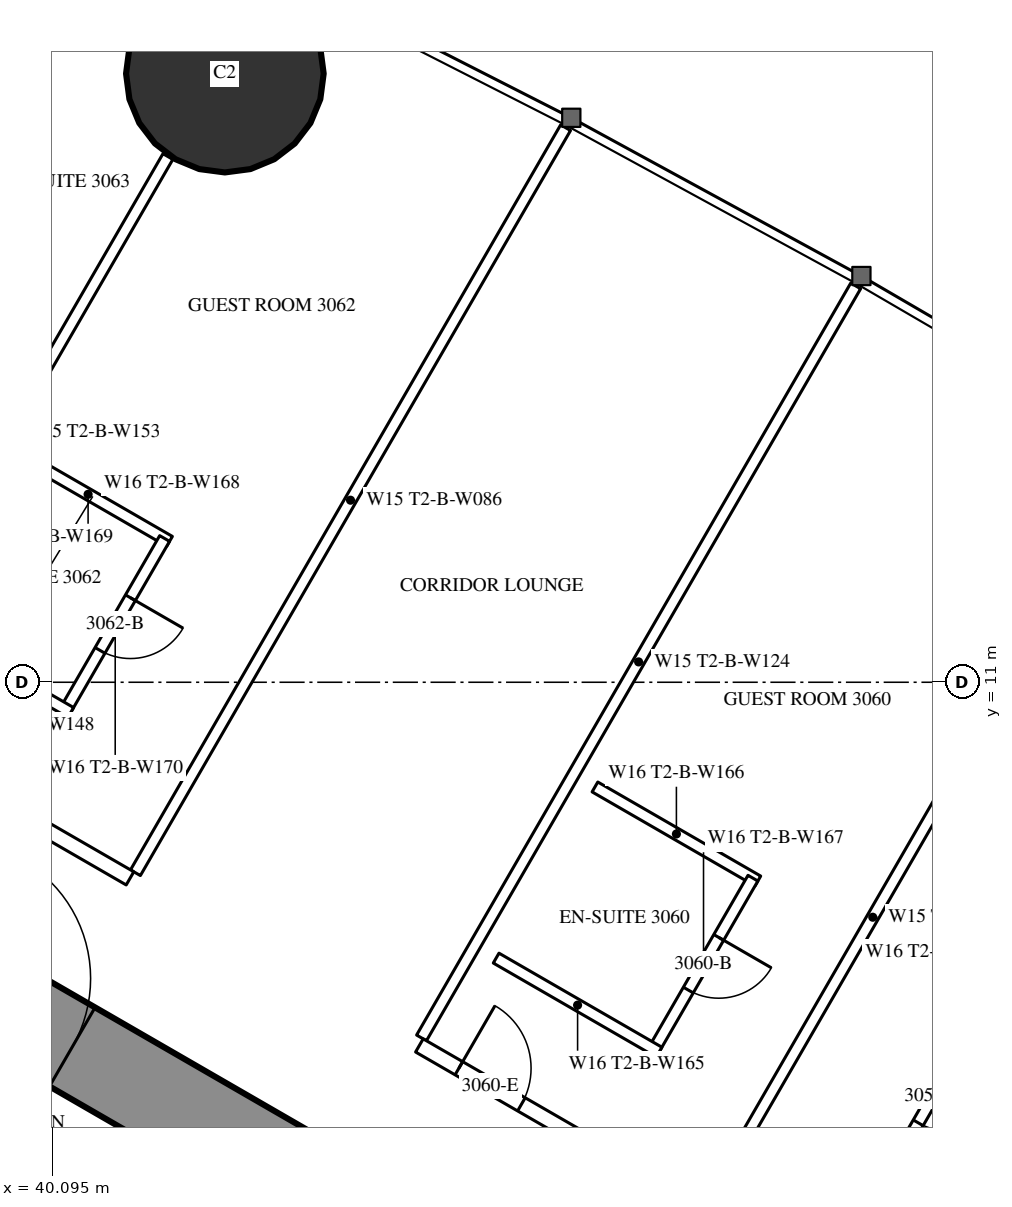
"""IFC4 building model, lengths in metres.
Left out: names, types, materials, properties, quantities, classifications, styles, units other than length and angle.
Written with IfcOpenShell. Run it as: python <this file> out.ifc"""

import sys

from ifc_helpers import new_model, si_unit, direction, frame, frame_2d, origin, origin_2d, place, context, subcontext, project, spatial, rectangle, hollow_circle, extrude, element, fill, save


model = new_model("IFC4")
c1 = context("Model", 3, precision=1e-05, world=origin(), true_north=direction((0.0, 1.0)))
c2 = subcontext(c1, "Body", "Model", "MODEL_VIEW")
j1 = project(units=[si_unit("LENGTHUNIT", "METRE"), si_unit("PLANEANGLEUNIT", "RADIAN")], contexts=[c1])
p1 = place(None, origin())
s1 = spatial("IfcSite", under=j1, at=p1, CompositionType="ELEMENT")
p2 = place(p1, origin())
s2 = spatial("IfcBuilding", under=s1, at=p2, CompositionType="ELEMENT")
p3 = place(p2, frame((0.0, 0.0, 115.1)))
s3 = spatial("IfcBuildingStorey", under=s2, at=p3, CompositionType="ELEMENT", Elevation=115.1)
p4 = place(p3, frame((42.366, 19.007, 0.0), z_axis=(0.0, 0.0, 1.0), x_axis=(1.0, 0.0, 0.0)))
e1 = element("IfcColumn", 1, at=p4, inside=s3, PredefinedType="COLUMN", context=c2, shape_type="SweptSolid", body=[
    extrude(hollow_circle(Radius=1.3, WallThickness=0.1, at=origin_2d()), origin(), (0.0, 0.0, 1.0), 3.5),
])
p5 = place(p3, frame((27.2, 13.8, 0.0), z_axis=(0.0, 0.0, 1.0), x_axis=(0.866024515034, -0.500001539357, 0.0)))
e2 = element("IfcWall", 2, at=p5, inside=s3, PredefinedType="SHEAR", context=c2, shape_type="SweptSolid", body=[
    extrude(rectangle(XDim=26.907, YDim=1.2, at=frame_2d((13.454, 0.0))), origin(), (0.0, 0.0, 1.0), 3.5),
])
p6 = place(p5, frame((4.6, 0.0, 0.0)))
e3 = element("IfcOpeningElement", 3, at=p6, cuts=e2, PredefinedType="OPENING", context=c2, shape_type="SweptSolid", body=[
    extrude(rectangle(XDim=1.0, YDim=2.2, at=frame_2d((0.5, 1.1))), frame((0.0, 0.61, 0.0), z_axis=(0.0, -1.0, 0.0), x_axis=(1.0, 0.0, 0.0)), (0.0, 0.0, 1.0), 1.22),
])
p7 = place(p5, frame((13.395, 0.0, 0.0)))
e4 = element("IfcOpeningElement", 4, at=p7, cuts=e2, PredefinedType="OPENING", context=c2, shape_type="SweptSolid", body=[
    extrude(rectangle(XDim=1.8, YDim=2.2, at=frame_2d((0.9, 1.1))), frame((0.0, 0.61, 0.0), z_axis=(0.0, -1.0, 0.0), x_axis=(1.0, 0.0, 0.0)), (0.0, 0.0, 1.0), 1.22),
])
p8 = place(p3, frame((37.43, 10.665, 0.0), z_axis=(0.0, 0.0, 1.0), x_axis=(0.499989991081, 0.866031182359, 0.0)))
e5 = element("IfcWall", 5, at=p8, inside=s3, PredefinedType="PARTITIONING", context=c2, shape_type="SweptSolid", body=[
    extrude(rectangle(XDim=8.373, YDim=0.15, at=frame_2d((4.187, 0.0))), origin(), (0.0, 0.0, 1.0), 2.2),
])
p9 = place(p3, frame((41.19, 8.494, 0.0), z_axis=(0.0, 0.0, 1.0), x_axis=(0.49999258054, 0.866029687369, 0.0)))
e6 = element("IfcWall", 6, at=p9, inside=s3, PredefinedType="PARTITIONING", context=c2, shape_type="SweptSolid", body=[
    extrude(rectangle(XDim=11.318, YDim=0.15, at=frame_2d((5.659, 0.0))), origin(), (0.0, 0.0, 1.0), 3.25),
])
p10 = place(p3, frame((44.954, 6.321, 0.0), z_axis=(0.0, 0.0, 1.0), x_axis=(0.500009815811, 0.866019736549, 0.0)))
e7 = element("IfcWall", 7, at=p10, inside=s3, PredefinedType="PARTITIONING", context=c2, shape_type="SweptSolid", body=[
    extrude(rectangle(XDim=11.424, YDim=0.15, at=frame_2d((5.712, 0.0))), origin(), (0.0, 0.0, 1.0), 3.25),
])
p11 = place(p3, frame((48.719, 4.147, 0.0), z_axis=(0.0, 0.0, 1.0), x_axis=(0.499993328235, 0.866029255696, 0.0)))
e8 = element("IfcWall", 8, at=p11, inside=s3, PredefinedType="PARTITIONING", context=c2, shape_type="SweptSolid", body=[
    extrude(rectangle(XDim=8.686, YDim=0.15, at=frame_2d((4.343, 0.0))), origin(), (0.0, 0.0, 1.0), 2.2),
])
p12 = place(p3, frame((36.834, 10.894, 0.0), z_axis=(0.0, 0.0, 1.0), x_axis=(0.866032723471, -0.499987321717, 0.0)))
e9 = element("IfcWall", 9, at=p12, inside=s3, PredefinedType="PARTITIONING", context=c2, shape_type="SweptSolid", body=[
    extrude(rectangle(XDim=4.947, YDim=0.2, at=frame_2d((2.474, 0.0))), origin(), (0.0, 0.0, 1.0), 3.25),
])
p13 = place(p12, frame((1.006, 0.0, 0.0)))
e10 = element("IfcOpeningElement", 10, at=p13, cuts=e9, PredefinedType="OPENING", context=c2, shape_type="SweptSolid", body=[
    extrude(rectangle(XDim=0.95, YDim=2.2, at=frame_2d((0.475, 1.1))), frame((0.0, 0.11, 0.0), z_axis=(0.0, -1.0, 0.0), x_axis=(1.0, 0.0, 0.0)), (0.0, 0.0, 1.0), 0.22),
])
p14 = place(p3, frame((44.925, 6.222, 0.0), z_axis=(0.0, 0.0, 1.0), x_axis=(0.866025590081, -0.499999677325, 0.0)))
e11 = element("IfcWall", 11, at=p14, inside=s3, PredefinedType="PARTITIONING", context=c2, shape_type="SweptSolid", body=[
    extrude(rectangle(XDim=12.324, YDim=0.2, at=frame_2d((6.162, 0.0))), origin(), (0.0, 0.0, 1.0), 3.25),
])
p15 = place(p14, frame((9.042, 0.0, 0.0)))
e12 = element("IfcOpeningElement", 12, at=p15, cuts=e11, PredefinedType="OPENING", context=c2, shape_type="SweptSolid", body=[
    extrude(rectangle(XDim=0.95, YDim=2.2, at=frame_2d((0.475, 1.1))), frame((0.0, 0.11, 0.0), z_axis=(0.0, -1.0, 0.0), x_axis=(1.0, 0.0, 0.0)), (0.0, 0.0, 1.0), 0.22),
])
p16 = place(p14, frame((7.342, 0.0, 0.0)))
e13 = element("IfcOpeningElement", 13, at=p16, cuts=e11, PredefinedType="OPENING", context=c2, shape_type="SweptSolid", body=[
    extrude(rectangle(XDim=0.95, YDim=2.2, at=frame_2d((0.475, 1.1))), frame((0.0, 0.11, 0.0), z_axis=(0.0, -1.0, 0.0), x_axis=(1.0, 0.0, 0.0)), (0.0, 0.0, 1.0), 0.22),
])
p17 = place(p14, frame((0.6, 0.0, 0.0)))
e14 = element("IfcOpeningElement", 14, at=p17, cuts=e11, PredefinedType="OPENING", context=c2, shape_type="SweptSolid", body=[
    extrude(rectangle(XDim=0.95, YDim=2.2, at=frame_2d((0.475, 1.1))), frame((0.0, 0.11, 0.0), z_axis=(0.0, -1.0, 0.0), x_axis=(1.0, 0.0, 0.0)), (0.0, 0.0, 1.0), 0.22),
])
p18 = place(p3, frame((51.038, 4.425, 0.0), z_axis=(0.0, 0.0, 1.0), x_axis=(0.49997716683, 0.86603858612, 0.0)))
e15 = element("IfcWall", 15, at=p18, inside=s3, PredefinedType="PARTITIONING", context=c2, shape_type="SweptSolid", body=[
    extrude(rectangle(XDim=2.6, YDim=0.15, at=frame_2d((1.3, 0.0))), origin(), (0.0, 0.0, 1.0), 3.25),
])
p19 = place(p18, frame((0.9, 0.0, 0.0)))
e16 = element("IfcOpeningElement", 16, at=p19, cuts=e15, PredefinedType="OPENING", context=c2, shape_type="SweptSolid", body=[
    extrude(rectangle(XDim=0.8, YDim=2.2, at=frame_2d((0.4, 1.1))), frame((0.0, 0.085, 0.0), z_axis=(0.0, -1.0, 0.0), x_axis=(1.0, 0.0, 0.0)), (0.0, 0.0, 1.0), 0.17),
])
p20 = place(p3, frame((47.235, 9.623, 0.0), z_axis=(0.0, 0.0, 1.0), x_axis=(0.866006523861, -0.500032699561, 0.0)))
e17 = element("IfcWall", 17, at=p20, inside=s3, PredefinedType="PARTITIONING", context=c2, shape_type="SweptSolid", body=[
    extrude(rectangle(XDim=2.475, YDim=0.15, at=frame_2d((1.237, 0.0))), origin(), (0.0, 0.0, 1.0), 3.25),
])
p21 = place(p3, frame((48.013, 6.171, 0.0), z_axis=(0.0, 0.0, 1.0), x_axis=(0.500006934395, 0.866021400173, 0.0)))
e18 = element("IfcWall", 18, at=p21, inside=s3, PredefinedType="PARTITIONING", context=c2, shape_type="SweptSolid", body=[
    extrude(rectangle(XDim=2.6, YDim=0.15, at=frame_2d((1.3, 0.0))), origin(), (0.0, 0.0, 1.0), 3.25),
])
p22 = place(p21, frame((0.9, 0.0, 0.0)))
e19 = element("IfcOpeningElement", 19, at=p22, cuts=e18, PredefinedType="OPENING", context=c2, shape_type="SweptSolid", body=[
    extrude(rectangle(XDim=0.8, YDim=2.2, at=frame_2d((0.4, 1.1))), frame((0.0, 0.085, 0.0), z_axis=(0.0, -1.0, 0.0), x_axis=(1.0, 0.0, 0.0)), (0.0, 0.0, 1.0), 0.17),
])
p23 = place(p3, frame((45.935, 7.371, 0.0), z_axis=(0.0, 0.0, 1.0), x_axis=(0.866031185235, -0.4999899861, 0.0)))
e20 = element("IfcWall", 20, at=p23, inside=s3, PredefinedType="PARTITIONING", context=c2, shape_type="SweptSolid", body=[
    extrude(rectangle(XDim=2.475, YDim=0.15, at=frame_2d((1.238, 0.0))), origin(), (0.0, 0.0, 1.0), 3.25),
])
p24 = place(p3, frame((39.495, 14.092, 0.0), z_axis=(0.0, 0.0, 1.0), x_axis=(0.866006523861, -0.500032699561, 0.0)))
e21 = element("IfcWall", 21, at=p24, inside=s3, PredefinedType="PARTITIONING", context=c2, shape_type="SweptSolid", body=[
    extrude(rectangle(XDim=2.475, YDim=0.15, at=frame_2d((1.237, 0.0))), origin(), (0.0, 0.0, 1.0), 3.25),
])
p25 = place(p3, frame((40.274, 10.64, 0.0), z_axis=(0.0, 0.0, 1.0), x_axis=(0.49997716683, 0.86603858612, 0.0)))
e22 = element("IfcWall", 22, at=p25, inside=s3, PredefinedType="PARTITIONING", context=c2, shape_type="SweptSolid", body=[
    extrude(rectangle(XDim=2.6, YDim=0.15, at=frame_2d((1.3, 0.0))), origin(), (0.0, 0.0, 1.0), 3.25),
])
p26 = place(p25, frame((0.9, 0.0, 0.0)))
e23 = element("IfcOpeningElement", 23, at=p26, cuts=e22, PredefinedType="OPENING", context=c2, shape_type="SweptSolid", body=[
    extrude(rectangle(XDim=0.8, YDim=2.2, at=frame_2d((0.4, 1.1))), frame((0.0, 0.085, 0.0), z_axis=(0.0, -1.0, 0.0), x_axis=(1.0, 0.0, 0.0)), (0.0, 0.0, 1.0), 0.17),
])
p27 = place(p3, frame((38.195, 11.84, 0.0), z_axis=(0.0, 0.0, 1.0), x_axis=(0.866031185235, -0.4999899861, 0.0)))
e24 = element("IfcWall", 24, at=p27, inside=s3, PredefinedType="PARTITIONING", context=c2, shape_type="SweptSolid", body=[
    extrude(rectangle(XDim=2.475, YDim=0.15, at=frame_2d((1.238, 0.0))), origin(), (0.0, 0.0, 1.0), 3.25),
])
p28 = place(p19, origin())
e25 = element("IfcDoor", 25, at=p28, inside=s3, OperationType="SINGLE_SWING_RIGHT", PredefinedType="DOOR", context=c2, shape_type="SweptSolid", body=[
    extrude(rectangle(XDim=0.8, YDim=2.2, at=frame_2d((0.4, 1.1))), frame((0.0, 0.025, 0.0), z_axis=(0.0, -1.0, 0.0), x_axis=(1.0, 0.0, 0.0)), (0.0, 0.0, 1.0), 0.05),
])
fill(e16, e25)
p29 = place(p22, origin())
e26 = element("IfcDoor", 26, at=p29, inside=s3, OperationType="SINGLE_SWING_RIGHT", PredefinedType="DOOR", context=c2, shape_type="SweptSolid", body=[
    extrude(rectangle(XDim=0.8, YDim=2.2, at=frame_2d((0.4, 1.1))), frame((0.0, 0.025, 0.0), z_axis=(0.0, -1.0, 0.0), x_axis=(1.0, 0.0, 0.0)), (0.0, 0.0, 1.0), 0.05),
])
fill(e19, e26)
p30 = place(p17, origin())
e27 = element("IfcDoor", 27, at=p30, inside=s3, OperationType="SINGLE_SWING_LEFT", PredefinedType="DOOR", context=c2, shape_type="SweptSolid", body=[
    extrude(rectangle(XDim=0.95, YDim=2.2, at=frame_2d((0.475, 1.1))), frame((0.0, 0.025, 0.0), z_axis=(0.0, -1.0, 0.0), x_axis=(1.0, 0.0, 0.0)), (0.0, 0.0, 1.0), 0.05),
])
fill(e14, e27)
p31 = place(p26, origin())
e28 = element("IfcDoor", 28, at=p31, inside=s3, OperationType="SINGLE_SWING_RIGHT", PredefinedType="DOOR", context=c2, shape_type="SweptSolid", body=[
    extrude(rectangle(XDim=0.8, YDim=2.2, at=frame_2d((0.4, 1.1))), frame((0.0, 0.025, 0.0), z_axis=(0.0, -1.0, 0.0), x_axis=(1.0, 0.0, 0.0)), (0.0, 0.0, 1.0), 0.05),
])
fill(e23, e28)
p32 = place(p7, origin())
e29 = element("IfcDoor", 29, at=p32, inside=s3, OperationType="DOUBLE_DOOR_SINGLE_SWING", PredefinedType="DOOR", context=c2, shape_type="SweptSolid", body=[
    extrude(rectangle(XDim=1.8, YDim=2.2, at=frame_2d((0.9, 1.1))), frame((0.0, 0.025, 0.0), z_axis=(0.0, -1.0, 0.0), x_axis=(1.0, 0.0, 0.0)), (0.0, 0.0, 1.0), 0.05),
])
fill(e4, e29)
save(model, sys.argv[1])
